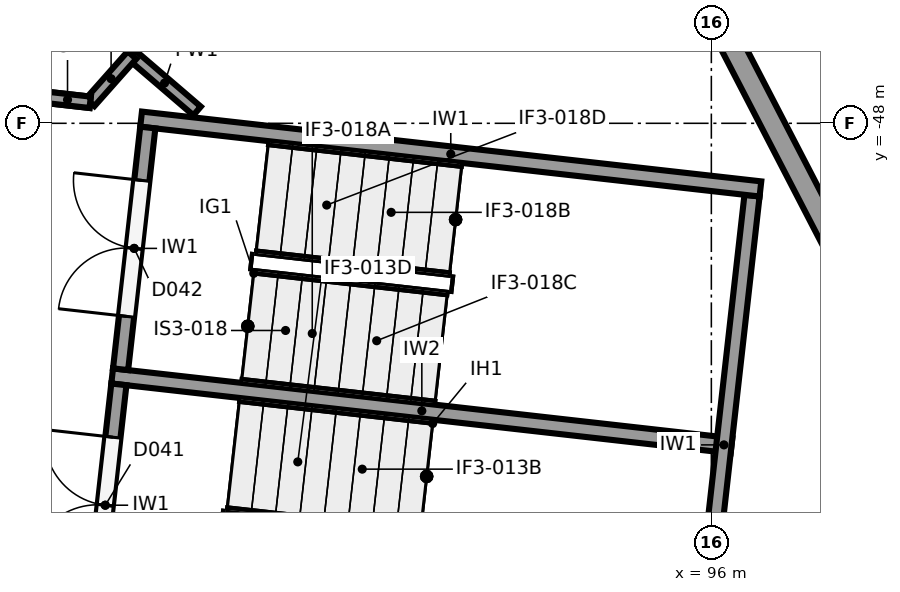
"""IFC4 building model, lengths in metres.
Left out: names, types, materials, properties, quantities, classifications, styles, units other than length and angle.
Written with IfcOpenShell. Run it as: python <this file> out.ifc"""

import sys

from ifc_helpers import new_model, si_unit, direction, frame, frame_2d, origin, place, context, subcontext, project, spatial, rectangle, extrude, element, fill, save


model = new_model("IFC4")
c1 = context("Model", 3, precision=1e-05, world=origin(), true_north=direction((0.0, 1.0)))
c2 = subcontext(c1, "Body", "Model", "MODEL_VIEW")
j1 = project(units=[si_unit("LENGTHUNIT", "METRE"), si_unit("PLANEANGLEUNIT", "RADIAN")], contexts=[c1])
p1 = place(None, origin())
s1 = spatial("IfcSite", under=j1, at=p1, CompositionType="ELEMENT")
p2 = place(p1, origin())
s2 = spatial("IfcBuilding", under=s1, at=p2, CompositionType="ELEMENT")
p3 = place(p2, frame((0.0, 0.0, 6.5)))
s3 = spatial("IfcBuildingStorey", under=s2, at=p3, CompositionType="ELEMENT", Elevation=6.5)
p4 = place(p3, frame((94.807, -44.149, 0.0), z_axis=(0.0, 0.0, 1.0), x_axis=(0.460021193284, -0.887907935391, 0.0)))
e1 = element("IfcWall", 1, at=p4, inside=s3, PredefinedType="SOLIDWALL", context=c2, shape_type="SweptSolid", body=[
    extrude(rectangle(XDim=13.075, YDim=0.3, at=frame_2d((6.538, 0.0))), origin(), (0.0, 0.0, 1.0), 3.85),
])
p5 = place(p3, frame((96.646, -48.863, 0.0), z_axis=(0.0, 0.0, 1.0), x_axis=(-0.993714104693, 0.111947658007, 0.0)))
e2 = element("IfcWall", 2, at=p5, inside=s3, PredefinedType="SHEAR", context=c2, shape_type="SweptSolid", body=[
    extrude(rectangle(XDim=8.2, YDim=0.2, at=frame_2d((4.1, 0.0))), origin(), (0.0, 0.0, 1.0), 5.15),
])
p6 = place(p3, frame((95.796, -55.51, 0.0), z_axis=(0.0, 0.0, 1.0), x_axis=(0.111970106426, 0.993711575492, 0.0)))
e3 = element("IfcWall", 3, at=p6, inside=s3, PredefinedType="SHEAR", context=c2, shape_type="SweptSolid", body=[
    extrude(rectangle(XDim=6.6, YDim=0.2, at=frame_2d((3.3, 0.0))), origin(), (0.0, 0.0, 1.0), 5.15),
])
p7 = place(p3, frame((96.265, -52.242, 0.0), z_axis=(0.0, 0.0, 1.0), x_axis=(-0.993713731549, 0.111950970206, 0.0)))
e4 = element("IfcWall", 4, at=p7, inside=s3, PredefinedType="SHEAR", context=c2, shape_type="SweptSolid", body=[
    extrude(rectangle(XDim=8.2, YDim=0.2, at=frame_2d((4.1, 0.0))), origin(), (0.0, 0.0, 1.0), 5.15),
])
p8 = place(p3, frame((87.846, -54.614, 0.0), z_axis=(0.0, 0.0, 1.0), x_axis=(0.112005735442, 0.993707560215, 0.0)))
e5 = element("IfcWall", 5, at=p8, inside=s3, PredefinedType="SHEAR", context=c2, shape_type="SweptSolid", body=[
    extrude(rectangle(XDim=3.2, YDim=0.2, at=frame_2d((1.6, 0.0))), origin(), (0.0, 0.0, 1.0), 5.15),
])
p9 = place(p8, frame((0.7, 0.0, 0.0)))
e6 = element("IfcOpeningElement", 6, at=p9, cuts=e5, PredefinedType="OPENING", context=c2, shape_type="SweptSolid", body=[
    extrude(rectangle(XDim=1.8, YDim=2.1, at=frame_2d((0.9, 1.05))), frame((0.0, 0.11, 0.0), z_axis=(0.0, -1.0, 0.0), x_axis=(1.0, 0.0, 0.0)), (0.0, 0.0, 1.0), 0.22),
])
p10 = place(p3, frame((88.227, -51.236, 0.0), z_axis=(0.0, 0.0, 1.0), x_axis=(0.111930393474, 0.993716049491, 0.0)))
e7 = element("IfcWall", 7, at=p10, inside=s3, PredefinedType="SHEAR", context=c2, shape_type="SweptSolid", body=[
    extrude(rectangle(XDim=3.2, YDim=0.2, at=frame_2d((1.6, 0.0))), origin(), (0.0, 0.0, 1.0), 5.15),
])
p11 = place(p10, frame((0.7, 0.0, 0.0)))
e8 = element("IfcOpeningElement", 8, at=p11, cuts=e7, PredefinedType="OPENING", context=c2, shape_type="SweptSolid", body=[
    extrude(rectangle(XDim=1.8, YDim=2.1, at=frame_2d((0.9, 1.05))), frame((0.0, 0.11, 0.0), z_axis=(0.0, -1.0, 0.0), x_axis=(1.0, 0.0, 0.0)), (0.0, 0.0, 1.0), 0.22),
])
p12 = place(p3, frame((89.234, -47.837, 0.0), z_axis=(0.0, 0.0, 1.0), x_axis=(-0.758950911089, 0.651147843855, 0.0)))
e9 = element("IfcWall", 9, at=p12, inside=s3, PredefinedType="PARTITIONING", context=c2, shape_type="SweptSolid", body=[
    extrude(rectangle(XDim=1.128, YDim=0.15, at=frame_2d((0.564, 0.0))), origin(), (0.0, 0.0, 1.0), 5.15),
])
p13 = place(p3, frame((88.378, -47.103, 0.0), z_axis=(0.0, 0.0, 1.0), x_axis=(-0.66330376879, -0.748350259109, 0.0)))
e10 = element("IfcWall", 10, at=p13, inside=s3, PredefinedType="PARTITIONING", context=c2, shape_type="SweptSolid", body=[
    extrude(rectangle(XDim=0.83, YDim=0.15, at=frame_2d((0.415, 0.0))), origin(), (0.0, 0.0, 1.0), 5.15),
])
p14 = place(p3, frame((87.827, -47.724, 0.0), z_axis=(0.0, 0.0, 1.0), x_axis=(-0.993708869306, 0.11199412066, 0.0)))
e11 = element("IfcWall", 11, at=p14, inside=s3, PredefinedType="PARTITIONING", context=c2, shape_type="SweptSolid", body=[
    extrude(rectangle(XDim=3.704, YDim=0.15, at=frame_2d((1.852, 0.0))), origin(), (0.0, 0.0, 1.0), 4.05),
])
p15 = place(p14, frame((0.65, 0.0, 0.0)))
e12 = element("IfcOpeningElement", 12, at=p15, cuts=e11, PredefinedType="OPENING", context=c2, shape_type="SweptSolid", body=[
    extrude(rectangle(XDim=1.8, YDim=2.1, at=frame_2d((0.9, 1.05))), frame((0.0, 0.085, 0.0), z_axis=(0.0, -1.0, 0.0), x_axis=(1.0, 0.0, 0.0)), (0.0, 0.0, 1.0), 0.17),
])
p16 = place(p3, frame((87.827, -47.724, 4.05), z_axis=(0.0, 0.0, 1.0), x_axis=(-0.993673547442, 0.112307083986, 0.0)))
e13 = element("IfcWall", 13, at=p16, inside=s3, PredefinedType="PARTITIONING", context=c2, shape_type="SweptSolid", body=[
    extrude(rectangle(XDim=0.6, YDim=0.15, at=frame_2d((0.3, 0.0))), origin(), (0.0, 0.0, 1.0), 1.1),
])
p17 = place(p9, origin())
e14 = element("IfcDoor", 14, at=p17, inside=s3, OperationType="DOUBLE_DOOR_SINGLE_SWING", PredefinedType="DOOR", context=c2, shape_type="SweptSolid", body=[
    extrude(rectangle(XDim=1.8, YDim=2.1, at=frame_2d((0.9, 1.05))), frame((0.0, 0.025, 0.0), z_axis=(0.0, -1.0, 0.0), x_axis=(1.0, 0.0, 0.0)), (0.0, 0.0, 1.0), 0.05),
])
fill(e6, e14)
p18 = place(p11, origin())
e15 = element("IfcDoor", 15, at=p18, inside=s3, OperationType="DOUBLE_DOOR_SINGLE_SWING", PredefinedType="DOOR", context=c2, shape_type="SweptSolid", body=[
    extrude(rectangle(XDim=1.8, YDim=2.1, at=frame_2d((0.9, 1.05))), frame((0.0, 0.025, 0.0), z_axis=(0.0, -1.0, 0.0), x_axis=(1.0, 0.0, 0.0)), (0.0, 0.0, 1.0), 0.05),
])
fill(e8, e15)
save(model, sys.argv[1])
